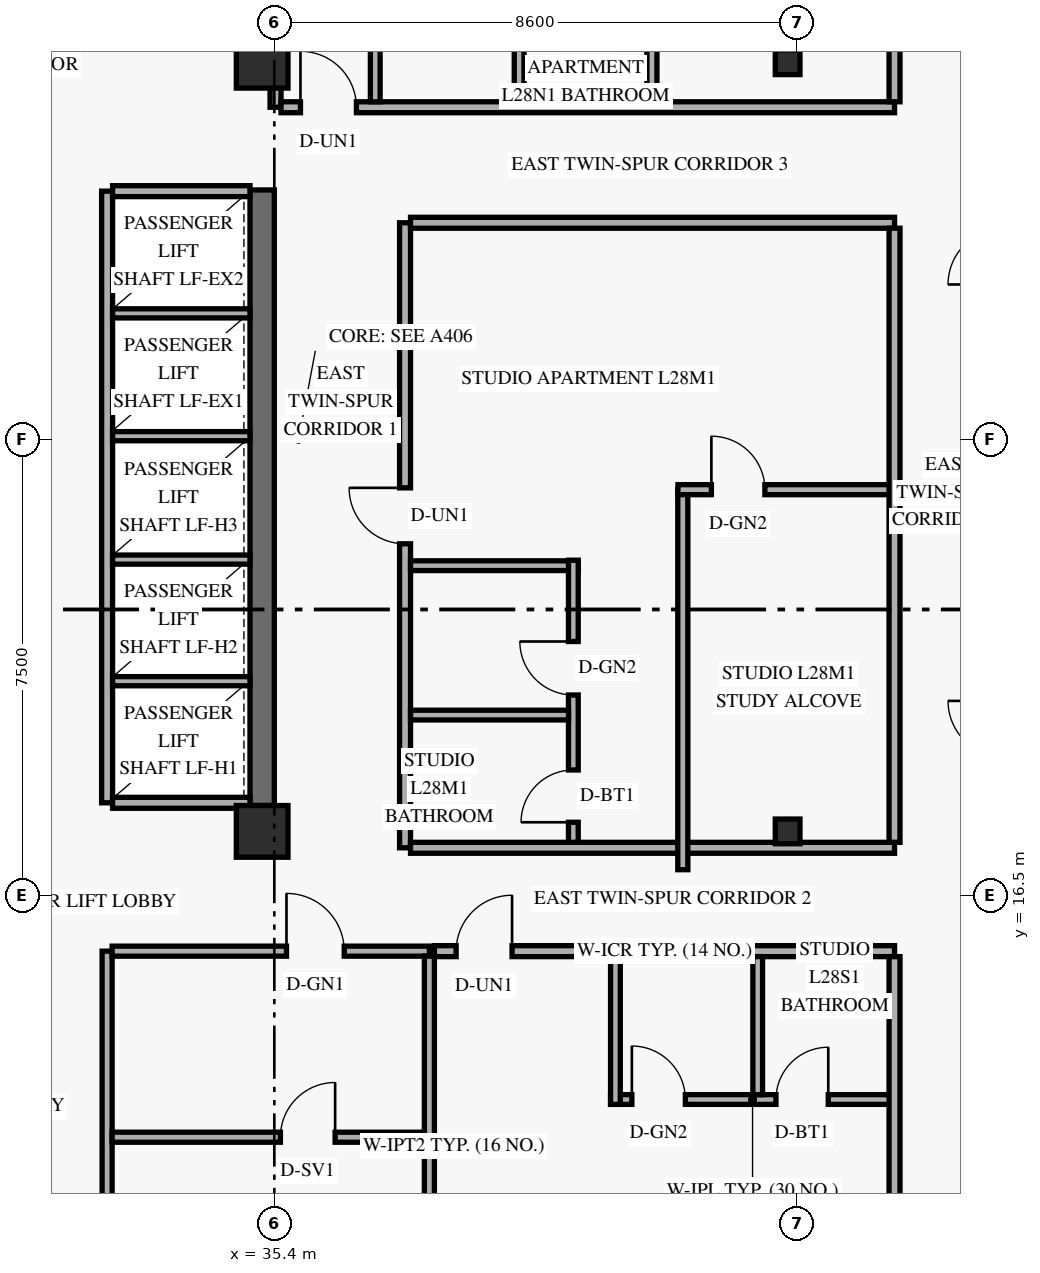
"""IFC4 building model, lengths in metres.
Left out: names, types, materials, properties, quantities, classifications, styles, units other than length and angle.
Written with IfcOpenShell. Run it as: python <this file> out.ifc"""

import sys

from ifc_helpers import new_model, si_unit, direction, frame, frame_2d, origin, origin_2d, place, context, subcontext, project, spatial, rectangle, hollow_rectangle, extrude, element, fill, save


model = new_model("IFC4")
c1 = context("Model", 3, precision=1e-05, world=origin(), true_north=direction((0.0, 1.0)))
c2 = subcontext(c1, "Body", "Model", "MODEL_VIEW")
j1 = project(units=[si_unit("LENGTHUNIT", "METRE"), si_unit("PLANEANGLEUNIT", "RADIAN")], contexts=[c1])
p1 = place(None, origin())
s1 = spatial("IfcSite", under=j1, at=p1, CompositionType="ELEMENT")
p2 = place(p1, origin())
s2 = spatial("IfcBuilding", under=s1, at=p2, CompositionType="ELEMENT")
p3 = place(p2, frame((0.0, 0.0, 109.8)))
s3 = spatial("IfcBuildingStorey", under=s2, at=p3, CompositionType="ELEMENT", Elevation=109.8)
p4 = place(p3, frame((35.2, 17.975, 0.0), z_axis=(0.0, 0.0, 1.0), x_axis=(0.0, 1.0, 0.0)))
e1 = element("IfcWall", 1, at=p4, inside=s3, PredefinedType="SHEAR", context=c2, shape_type="SweptSolid", body=[
    extrude(rectangle(XDim=10.125, YDim=0.4, at=frame_2d((5.062, 0.0))), origin(), (0.0, 0.0, 1.0), 2.749),
])
for number, where, z_axis, x_axis in (
    (2, (35.2, 17.55, 0.0), (0.0, 0.0, 1.0), (1.0, 0.0, 0.0)),
    (3, (35.2, 30.2, 0.0), (0.0, 0.0, 1.0), (1.0, 0.0, 0.0)),
):
    element("IfcColumn", number, at=place(p3, frame(where, z_axis=z_axis, x_axis=x_axis)), inside=s3, PredefinedType="COLUMN", context=c2, shape_type="SweptSolid", body=[
        extrude(rectangle(XDim=0.85, YDim=0.85, at=origin_2d()), origin(), (0.0, 0.0, 1.0), 3.6),
    ])
for number, where, z_axis, x_axis in (
    (4, (43.779, 17.55, 0.0), (0.035, 0.0, 0.999), (0.0, 1.0, 0.0)),
    (5, (43.779, 30.2, 0.0), (0.035, 0.0, 0.999), (0.0, 1.0, 0.0)),
):
    element("IfcColumn", number, at=place(p3, frame(where, z_axis=z_axis, x_axis=x_axis)), inside=s3, PredefinedType="COLUMN", context=c2, shape_type="SweptSolid", body=[
        extrude(hollow_rectangle(XDim=0.406, YDim=0.406, WallThickness=0.016, at=origin_2d()), origin(), (0.0, 0.0, 1.0), 3.602),
    ])
p5 = place(p3, frame((32.65, 18.02, 0.0), z_axis=(0.0, 0.0, 1.0), x_axis=(0.0, 1.0, 0.0)))
e6 = element("IfcWall", 6, at=p5, inside=s3, PredefinedType="STANDARD", context=c2, shape_type="SweptSolid", body=[
    extrude(rectangle(XDim=10.06, YDim=0.18, at=frame_2d((5.03, 0.0))), origin(), (0.0, 0.0, 1.0), 3.36),
])
for number, where, z_axis, x_axis in (
    (7, (32.74, 18.02, 0.0), (0.0, 0.0, 1.0), (1.0, 0.0, 0.0)),
    (8, (32.74, 28.08, 0.0), (0.0, 0.0, 1.0), (1.0, 0.0, 0.0)),
):
    element("IfcWall", number, at=place(p3, frame(where, z_axis=z_axis, x_axis=x_axis)), inside=s3, PredefinedType="STANDARD", context=c2, shape_type="SweptSolid", body=[
        extrude(rectangle(XDim=2.26, YDim=0.18, at=frame_2d((1.13, 0.0))), origin(), (0.0, 0.0, 1.0), 3.36),
    ])
for number, where, z_axis, x_axis in (
    (9, (32.74, 20.02, 0.0), (0.0, 0.0, 1.0), (1.0, 0.0, 0.0)),
    (10, (32.74, 22.02, 0.0), (0.0, 0.0, 1.0), (1.0, 0.0, 0.0)),
    (11, (32.74, 24.05, 0.0), (0.0, 0.0, 1.0), (1.0, 0.0, 0.0)),
    (12, (32.74, 26.07, 0.0), (0.0, 0.0, 1.0), (1.0, 0.0, 0.0)),
):
    element("IfcWall", number, at=place(p3, frame(where, z_axis=z_axis, x_axis=x_axis)), inside=s3, PredefinedType="STANDARD", context=c2, shape_type="SweptSolid", body=[
        extrude(rectangle(XDim=2.26, YDim=0.15, at=frame_2d((1.13, 0.0))), origin(), (0.0, 0.0, 1.0), 3.36),
    ])
p6 = place(p3, frame((32.65, 9.5, 0.0), z_axis=(0.0, 0.0, 1.0), x_axis=(0.0, 1.0, 0.0)))
e13 = element("IfcWall", 13, at=p6, inside=s3, PredefinedType="PARTITIONING", context=c2, shape_type="SweptSolid", body=[
    extrude(rectangle(XDim=6.08, YDim=0.165, at=frame_2d((3.04, 0.0))), origin(), (0.0, 0.0, 1.0), 3.36),
])
p7 = place(p3, frame((32.732, 15.58, 0.0), z_axis=(0.0, 0.0, 1.0), x_axis=(1.0, 0.0, 0.0)))
e14 = element("IfcWall", 14, at=p7, inside=s3, PredefinedType="PARTITIONING", context=c2, shape_type="SweptSolid", body=[
    extrude(rectangle(XDim=5.218, YDim=0.165, at=frame_2d((2.609, 0.0))), origin(), (0.0, 0.0, 1.0), 2.731),
])
p8 = place(p7, frame((2.867, 0.0, 0.0)))
e15 = element("IfcOpeningElement", 15, at=p8, cuts=e14, PredefinedType="OPENING", context=c2, shape_type="SweptSolid", body=[
    extrude(rectangle(XDim=0.95, YDim=2.15, at=frame_2d((0.475, 1.075))), frame((0.0, 0.093, 0.0), z_axis=(0.0, -1.0, 0.0), x_axis=(1.0, 0.0, 0.0)), (0.0, 0.0, 1.0), 0.185),
])
p9 = place(p3, frame((37.95, 9.25, 0.0), z_axis=(0.0, 0.0, 1.0), x_axis=(0.0, 1.0, 0.0)))
e16 = element("IfcWall", 16, at=p9, inside=s3, PredefinedType="PARTITIONING", context=c2, shape_type="SweptSolid", body=[
    extrude(rectangle(XDim=6.248, YDim=0.165, at=frame_2d((3.124, 0.0))), origin(), (0.0, 0.0, 1.0), 2.731),
])
p10 = place(p3, frame((32.732, 12.52, 0.0), z_axis=(0.0, 0.0, 1.0), x_axis=(1.0, 0.0, 0.0)))
e17 = element("IfcWall", 17, at=p10, inside=s3, PredefinedType="PARTITIONING", context=c2, shape_type="SweptSolid", body=[
    extrude(rectangle(XDim=5.135, YDim=0.165, at=frame_2d((2.567, 0.0))), origin(), (0.0, 0.0, 1.0), 2.731),
])
p11 = place(p10, frame((2.768, 0.0, 0.0)))
e18 = element("IfcOpeningElement", 18, at=p11, cuts=e17, PredefinedType="OPENING", context=c2, shape_type="SweptSolid", body=[
    extrude(rectangle(XDim=0.9, YDim=2.1, at=frame_2d((0.45, 1.05))), frame((0.0, 0.093, 0.0), z_axis=(0.0, -1.0, 0.0), x_axis=(1.0, 0.0, 0.0)), (0.0, 0.0, 1.0), 0.185),
])
p12 = place(p3, frame((37.55, 17.28, 0.0), z_axis=(0.0, 0.0, 1.0), x_axis=(0.0, 1.0, 0.0)))
e19 = element("IfcWall", 19, at=p12, inside=s3, PredefinedType="STANDARD", context=c2, shape_type="SweptSolid", body=[
    extrude(rectangle(XDim=10.28, YDim=0.18, at=frame_2d((5.14, 0.0))), origin(), (0.0, 0.0, 1.0), 2.731),
])
p13 = place(p12, frame((5.0, 0.0, 0.0)))
e20 = element("IfcOpeningElement", 20, at=p13, cuts=e19, PredefinedType="OPENING", context=c2, shape_type="SweptSolid", body=[
    extrude(rectangle(XDim=0.92, YDim=2.15, at=frame_2d((0.46, 1.075))), frame((0.0, 0.1, 0.0), z_axis=(0.0, -1.0, 0.0), x_axis=(1.0, 0.0, 0.0)), (0.0, 0.0, 1.0), 0.2),
])
p14 = place(p3, frame((38.032, 15.58, 0.0), z_axis=(0.0, 0.0, 1.0), x_axis=(1.0, 0.0, 0.0)))
e21 = element("IfcWall", 21, at=p14, inside=s3, PredefinedType="STANDARD", context=c2, shape_type="SweptSolid", body=[
    extrude(rectangle(XDim=7.568, YDim=0.18, at=frame_2d((3.784, 0.0))), origin(), (0.0, 0.0, 1.0), 2.731),
])
p15 = place(p14, frame((0.357, 0.0, 0.0)))
e22 = element("IfcOpeningElement", 22, at=p15, cuts=e21, PredefinedType="OPENING", context=c2, shape_type="SweptSolid", body=[
    extrude(rectangle(XDim=0.92, YDim=2.15, at=frame_2d((0.46, 1.075))), frame((0.0, 0.1, 0.0), z_axis=(0.0, -1.0, 0.0), x_axis=(1.0, 0.0, 0.0)), (0.0, 0.0, 1.0), 0.2),
])
for number, where, z_axis, x_axis in (
    (23, (37.64, 17.28, 0.0), (0.0, 0.0, 1.0), (1.0, 0.0, 0.0)),
    (24, (37.64, 27.56, 0.0), (0.0, 0.0, 1.0), (1.0, 0.0, 0.0)),
):
    element("IfcWall", number, at=place(p3, frame(where, z_axis=z_axis, x_axis=x_axis)), inside=s3, PredefinedType="STANDARD", context=c2, shape_type="SweptSolid", body=[
        extrude(rectangle(XDim=7.96, YDim=0.18, at=frame_2d((3.98, 0.0))), origin(), (0.0, 0.0, 1.0), 2.731),
    ])
p16 = place(p3, frame((35.42, 29.46, 0.0), z_axis=(0.0, 0.0, 1.0), x_axis=(0.0, 1.0, 0.0)))
e25 = element("IfcWall", 25, at=p16, inside=s3, PredefinedType="STANDARD", context=c2, shape_type="SweptSolid", body=[
    extrude(rectangle(XDim=1.89, YDim=0.18, at=frame_2d((0.945, 0.0))), origin(), (0.0, 0.0, 1.0), 2.731),
])
p17 = place(p3, frame((35.51, 29.46, 0.0), z_axis=(0.0, 0.0, 1.0), x_axis=(1.0, 0.0, 0.0)))
e26 = element("IfcWall", 26, at=p17, inside=s3, PredefinedType="STANDARD", context=c2, shape_type="SweptSolid", body=[
    extrude(rectangle(XDim=10.09, YDim=0.18, at=frame_2d((5.045, 0.0))), origin(), (0.0, 0.0, 1.0), 2.731),
])
p18 = place(p17, frame((0.32, 0.0, 0.0)))
e27 = element("IfcOpeningElement", 27, at=p18, cuts=e26, PredefinedType="OPENING", context=c2, shape_type="SweptSolid", body=[
    extrude(rectangle(XDim=0.92, YDim=2.15, at=frame_2d((0.46, 1.075))), frame((0.0, 0.1, 0.0), z_axis=(0.0, -1.0, 0.0), x_axis=(1.0, 0.0, 0.0)), (0.0, 0.0, 1.0), 0.2),
])
p19 = place(p3, frame((40.93, 13.14, 0.0), z_axis=(0.0, 0.0, 1.0), x_axis=(1.0, 0.0, 0.0)))
e28 = element("IfcWall", 28, at=p19, inside=s3, PredefinedType="PLUMBINGWALL", context=c2, shape_type="SweptSolid", body=[
    extrude(rectangle(XDim=4.67, YDim=0.16, at=frame_2d((2.335, 0.0))), origin(), (0.0, 0.0, 1.0), 2.731),
])
p20 = place(p19, frame((0.35, 0.0, 0.0)))
e29 = element("IfcOpeningElement", 29, at=p20, cuts=e28, PredefinedType="OPENING", context=c2, shape_type="SweptSolid", body=[
    extrude(rectangle(XDim=0.88, YDim=2.12, at=frame_2d((0.44, 1.06))), frame((0.0, 0.09, 0.0), z_axis=(0.0, -1.0, 0.0), x_axis=(1.0, 0.0, 0.0)), (0.0, 0.0, 1.0), 0.18),
])
p21 = place(p19, frame((2.72, 0.0, 0.0)))
e30 = element("IfcOpeningElement", 30, at=p21, cuts=e28, PredefinedType="OPENING", context=c2, shape_type="SweptSolid", body=[
    extrude(rectangle(XDim=0.86, YDim=2.12, at=frame_2d((0.43, 1.06))), frame((0.0, 0.09, 0.0), z_axis=(0.0, -1.0, 0.0), x_axis=(1.0, 0.0, 0.0)), (0.0, 0.0, 1.0), 0.18),
])
p22 = place(p3, frame((41.01, 13.06, 0.0), z_axis=(0.0, 0.0, 1.0), x_axis=(0.0, 1.0, 0.0)))
e31 = element("IfcWall", 31, at=p22, inside=s3, PredefinedType="PLUMBINGWALL", context=c2, shape_type="SweptSolid", body=[
    extrude(rectangle(XDim=2.43, YDim=0.16, at=frame_2d((1.215, 0.0))), origin(), (0.0, 0.0, 1.0), 2.988),
])
p23 = place(p3, frame((43.35, 13.22, 0.0), z_axis=(0.0, 0.0, 1.0), x_axis=(0.0, 1.0, 0.0)))
e32 = element("IfcWall", 32, at=p23, inside=s3, PredefinedType="PLUMBINGWALL", context=c2, shape_type="SweptSolid", body=[
    extrude(rectangle(XDim=2.27, YDim=0.16, at=frame_2d((1.135, 0.0))), origin(), (0.0, 0.0, 1.0), 2.988),
])
p24 = place(p3, frame((41.61, 29.55, 0.0), z_axis=(0.0, 0.0, 1.0), x_axis=(0.0, 1.0, 0.0)))
e33 = element("IfcWall", 33, at=p24, inside=s3, PredefinedType="PARTITIONING", context=c2, shape_type="SweptSolid", body=[
    extrude(rectangle(XDim=15.47, YDim=0.165, at=frame_2d((7.735, 0.0))), origin(), (0.0, 0.0, 1.0), 2.731),
])
p25 = place(p24, frame((4.917, 0.0, 0.0)))
e34 = element("IfcOpeningElement", 34, at=p25, cuts=e33, PredefinedType="OPENING", context=c2, shape_type="SweptSolid", body=[
    extrude(rectangle(XDim=0.88, YDim=2.14, at=frame_2d((0.44, 1.07))), frame((0.0, 0.093, 0.0), z_axis=(0.0, -1.0, 0.0), x_axis=(1.0, 0.0, 0.0)), (0.0, 0.0, 1.0), 0.185),
])
p26 = place(p24, frame((9.255, 0.0, 0.0)))
e35 = element("IfcOpeningElement", 35, at=p26, cuts=e33, PredefinedType="OPENING", context=c2, shape_type="SweptSolid", body=[
    extrude(rectangle(XDim=0.88, YDim=2.12, at=frame_2d((0.44, 1.06))), frame((0.0, 0.093, 0.0), z_axis=(0.0, -1.0, 0.0), x_axis=(1.0, 0.0, 0.0)), (0.0, 0.0, 1.0), 0.185),
])
p27 = place(p3, frame((37.06, 29.55, 0.0), z_axis=(0.0, 0.0, 1.0), x_axis=(0.0, 1.0, 0.0)))
e36 = element("IfcWall", 36, at=p27, inside=s3, PredefinedType="PLUMBINGWALL", context=c2, shape_type="SweptSolid", body=[
    extrude(rectangle(XDim=2.625, YDim=0.16, at=frame_2d((1.312, 0.0))), origin(), (0.0, 0.0, 1.0), 2.731),
])
p28 = place(p3, frame((39.426, 29.55, 0.0), z_axis=(0.0, 0.0, 1.0), x_axis=(0.0, 1.0, 0.0)))
e37 = element("IfcWall", 37, at=p28, inside=s3, PredefinedType="PLUMBINGWALL", context=c2, shape_type="SweptSolid", body=[
    extrude(rectangle(XDim=2.465, YDim=0.16, at=frame_2d((1.232, 0.0))), origin(), (0.0, 0.0, 1.0), 2.731),
])
p29 = place(p3, frame((37.64, 21.92, 0.0), z_axis=(0.0, 0.0, 1.0), x_axis=(1.0, 0.0, 0.0)))
e38 = element("IfcWall", 38, at=p29, inside=s3, PredefinedType="PLUMBINGWALL", context=c2, shape_type="SweptSolid", body=[
    extrude(rectangle(XDim=2.758, YDim=0.16, at=frame_2d((1.379, 0.0))), origin(), (0.0, 0.0, 1.0), 2.731),
])
p30 = place(p3, frame((40.318, 17.37, 0.0), z_axis=(0.0, 0.0, 1.0), x_axis=(0.0, 1.0, 0.0)))
e39 = element("IfcWall", 39, at=p30, inside=s3, PredefinedType="PLUMBINGWALL", context=c2, shape_type="SweptSolid", body=[
    extrude(rectangle(XDim=4.64, YDim=0.16, at=frame_2d((2.32, 0.0))), origin(), (0.0, 0.0, 1.0), 2.731),
])
p31 = place(p30, frame((0.33, 0.0, 0.0)))
e40 = element("IfcOpeningElement", 40, at=p31, cuts=e39, PredefinedType="OPENING", context=c2, shape_type="SweptSolid", body=[
    extrude(rectangle(XDim=0.86, YDim=2.12, at=frame_2d((0.43, 1.06))), frame((0.0, 0.09, 0.0), z_axis=(0.0, -1.0, 0.0), x_axis=(1.0, 0.0, 0.0)), (0.0, 0.0, 1.0), 0.18),
])
p32 = place(p30, frame((2.423, 0.0, 0.0)))
e41 = element("IfcOpeningElement", 41, at=p32, cuts=e39, PredefinedType="OPENING", context=c2, shape_type="SweptSolid", body=[
    extrude(rectangle(XDim=0.88, YDim=2.12, at=frame_2d((0.44, 1.06))), frame((0.0, 0.09, 0.0), z_axis=(0.0, -1.0, 0.0), x_axis=(1.0, 0.0, 0.0)), (0.0, 0.0, 1.0), 0.18),
])
p33 = place(p3, frame((37.64, 19.463, 0.0), z_axis=(0.0, 0.0, 1.0), x_axis=(1.0, 0.0, 0.0)))
e42 = element("IfcWall", 42, at=p33, inside=s3, PredefinedType="PLUMBINGWALL", context=c2, shape_type="SweptSolid", body=[
    extrude(rectangle(XDim=2.598, YDim=0.16, at=frame_2d((1.299, 0.0))), origin(), (0.0, 0.0, 1.0), 2.731),
])
p34 = place(p3, frame((42.118, 16.92, 0.0), z_axis=(0.0, 0.0, 1.0), x_axis=(0.0, 1.0, 0.0)))
e43 = element("IfcWall", 43, at=p34, inside=s3, PredefinedType="PARTITIONING", context=c2, shape_type="SweptSolid", body=[
    extrude(rectangle(XDim=6.25, YDim=0.165, at=frame_2d((3.125, 0.0))), origin(), (0.0, 0.0, 1.0), 2.731),
])
p35 = place(p3, frame((42.038, 23.17, 0.0), z_axis=(0.0, 0.0, 1.0), x_axis=(1.0, 0.0, 0.0)))
e44 = element("IfcWall", 44, at=p35, inside=s3, PredefinedType="PARTITIONING", context=c2, shape_type="SweptSolid", body=[
    extrude(rectangle(XDim=3.922, YDim=0.165, at=frame_2d((1.961, 0.0))), origin(), (0.0, 0.0, 1.0), 2.731),
])
p36 = place(p35, frame((0.55, 0.0, 0.0)))
e45 = element("IfcOpeningElement", 45, at=p36, cuts=e44, PredefinedType="OPENING", context=c2, shape_type="SweptSolid", body=[
    extrude(rectangle(XDim=0.88, YDim=2.12, at=frame_2d((0.44, 1.06))), frame((0.0, 0.093, 0.0), z_axis=(0.0, -1.0, 0.0), x_axis=(1.0, 0.0, 0.0)), (0.0, 0.0, 1.0), 0.185),
])
p37 = place(p3, frame((45.6, 2.98, 0.0), z_axis=(0.0, 0.0, 1.0), x_axis=(0.0, 1.0, 0.0)))
e46 = element("IfcWall", 46, at=p37, inside=s3, PredefinedType="STANDARD", context=c2, shape_type="SweptSolid", body=[
    extrude(rectangle(XDim=12.51, YDim=0.18, at=frame_2d((6.255, 0.0))), origin(), (0.0, 0.0, 1.0), 2.731),
])
p38 = place(p3, frame((45.6, 17.37, 0.0), z_axis=(0.0, 0.0, 1.0), x_axis=(0.0, 1.0, 0.0)))
e47 = element("IfcWall", 47, at=p38, inside=s3, PredefinedType="STANDARD", context=c2, shape_type="SweptSolid", body=[
    extrude(rectangle(XDim=10.1, YDim=0.18, at=frame_2d((5.05, 0.0))), origin(), (0.0, 0.0, 1.0), 2.731),
])
p39 = place(p3, frame((45.6, 29.55, 0.0), z_axis=(0.0, 0.0, 1.0), x_axis=(0.0, 1.0, 0.0)))
e48 = element("IfcWall", 48, at=p39, inside=s3, PredefinedType="STANDARD", context=c2, shape_type="SweptSolid", body=[
    extrude(rectangle(XDim=15.47, YDim=0.18, at=frame_2d((7.735, 0.0))), origin(), (0.0, 0.0, 1.0), 2.731),
])
p40 = place(p8, origin())
e49 = element("IfcDoor", 49, at=p40, inside=s3, OperationType="SINGLE_SWING_LEFT", PredefinedType="DOOR", context=c2, shape_type="SweptSolid", body=[
    extrude(rectangle(XDim=0.95, YDim=2.15, at=frame_2d((0.475, 1.075))), frame((0.0, 0.025, 0.0), z_axis=(0.0, -1.0, 0.0), x_axis=(1.0, 0.0, 0.0)), (0.0, 0.0, 1.0), 0.05),
])
fill(e15, e49)
p41 = place(p11, origin())
e50 = element("IfcDoor", 50, at=p41, inside=s3, OperationType="SINGLE_SWING_RIGHT", PredefinedType="DOOR", context=c2, shape_type="SweptSolid", body=[
    extrude(rectangle(XDim=0.9, YDim=2.1, at=frame_2d((0.45, 1.05))), frame((0.0, 0.025, 0.0), z_axis=(0.0, -1.0, 0.0), x_axis=(1.0, 0.0, 0.0)), (0.0, 0.0, 1.0), 0.05),
])
fill(e18, e50)
p42 = place(p15, origin())
e51 = element("IfcDoor", 51, at=p42, inside=s3, OperationType="SINGLE_SWING_RIGHT", PredefinedType="DOOR", context=c2, shape_type="SweptSolid", body=[
    extrude(rectangle(XDim=0.92, YDim=2.15, at=frame_2d((0.46, 1.075))), frame((0.0, 0.025, 0.0), z_axis=(0.0, -1.0, 0.0), x_axis=(1.0, 0.0, 0.0)), (0.0, 0.0, 1.0), 0.05),
])
fill(e22, e51)
p43 = place(p20, origin())
e52 = element("IfcDoor", 52, at=p43, inside=s3, OperationType="SINGLE_SWING_LEFT", PredefinedType="DOOR", context=c2, shape_type="SweptSolid", body=[
    extrude(rectangle(XDim=0.88, YDim=2.12, at=frame_2d((0.44, 1.06))), frame((0.0, 0.025, 0.0), z_axis=(0.0, -1.0, 0.0), x_axis=(1.0, 0.0, 0.0)), (0.0, 0.0, 1.0), 0.05),
])
fill(e29, e52)
p44 = place(p21, origin())
e53 = element("IfcDoor", 53, at=p44, inside=s3, OperationType="SINGLE_SWING_RIGHT", PredefinedType="DOOR", context=c2, shape_type="SweptSolid", body=[
    extrude(rectangle(XDim=0.86, YDim=2.12, at=frame_2d((0.43, 1.06))), frame((0.0, 0.025, 0.0), z_axis=(0.0, -1.0, 0.0), x_axis=(1.0, 0.0, 0.0)), (0.0, 0.0, 1.0), 0.05),
])
fill(e30, e53)
p45 = place(p18, origin())
e54 = element("IfcDoor", 54, at=p45, inside=s3, OperationType="SINGLE_SWING_LEFT", PredefinedType="DOOR", context=c2, shape_type="SweptSolid", body=[
    extrude(rectangle(XDim=0.92, YDim=2.15, at=frame_2d((0.46, 1.075))), frame((0.0, 0.025, 0.0), z_axis=(0.0, -1.0, 0.0), x_axis=(1.0, 0.0, 0.0)), (0.0, 0.0, 1.0), 0.05),
])
fill(e27, e54)
p46 = place(p36, origin())
e55 = element("IfcDoor", 55, at=p46, inside=s3, OperationType="SINGLE_SWING_LEFT", PredefinedType="DOOR", context=c2, shape_type="SweptSolid", body=[
    extrude(rectangle(XDim=0.88, YDim=2.12, at=frame_2d((0.44, 1.06))), frame((0.0, 0.025, 0.0), z_axis=(0.0, -1.0, 0.0), x_axis=(1.0, 0.0, 0.0)), (0.0, 0.0, 1.0), 0.05),
])
fill(e45, e55)
p47 = place(p13, origin())
e56 = element("IfcDoor", 56, at=p47, inside=s3, OperationType="SINGLE_SWING_RIGHT", PredefinedType="DOOR", context=c2, shape_type="SweptSolid", body=[
    extrude(rectangle(XDim=0.92, YDim=2.15, at=frame_2d((0.46, 1.075))), frame((0.0, 0.025, 0.0), z_axis=(0.0, -1.0, 0.0), x_axis=(1.0, 0.0, 0.0)), (0.0, 0.0, 1.0), 0.05),
])
fill(e20, e56)
p48 = place(p31, origin())
e57 = element("IfcDoor", 57, at=p48, inside=s3, OperationType="SINGLE_SWING_LEFT", PredefinedType="DOOR", context=c2, shape_type="SweptSolid", body=[
    extrude(rectangle(XDim=0.86, YDim=2.12, at=frame_2d((0.43, 1.06))), frame((0.0, 0.025, 0.0), z_axis=(0.0, -1.0, 0.0), x_axis=(1.0, 0.0, 0.0)), (0.0, 0.0, 1.0), 0.05),
])
fill(e40, e57)
p49 = place(p32, origin())
e58 = element("IfcDoor", 58, at=p49, inside=s3, OperationType="SINGLE_SWING_RIGHT", PredefinedType="DOOR", context=c2, shape_type="SweptSolid", body=[
    extrude(rectangle(XDim=0.88, YDim=2.12, at=frame_2d((0.44, 1.06))), frame((0.0, 0.025, 0.0), z_axis=(0.0, -1.0, 0.0), x_axis=(1.0, 0.0, 0.0)), (0.0, 0.0, 1.0), 0.05),
])
fill(e41, e58)
save(model, sys.argv[1])
